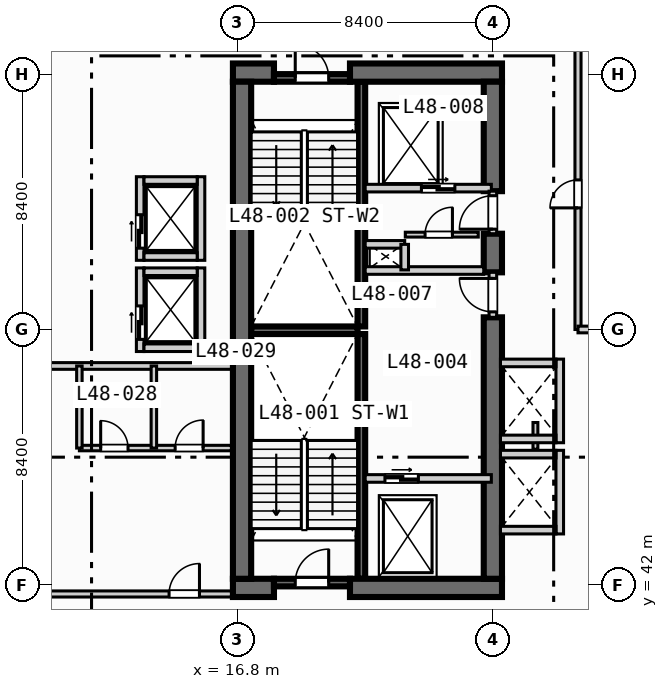
"""IFC4 building model, lengths in metres.
Left out: names, types, materials, properties, quantities, classifications, styles, units other than length and angle.
Written with IfcOpenShell. Run it as: python <this file> out.ifc"""

import sys

from ifc_helpers import new_model, si_unit, direction, frame, frame_2d, origin, place, context, subcontext, project, spatial, rectangle, extrude, element, fill, save


model = new_model("IFC4")
c1 = context("Model", 3, precision=1e-05, world=origin(), true_north=direction((0.0, 1.0)))
c2 = subcontext(c1, "Body", "Model", "MODEL_VIEW")
j1 = project(units=[si_unit("LENGTHUNIT", "METRE"), si_unit("PLANEANGLEUNIT", "RADIAN")], contexts=[c1])
p1 = place(None, origin())
s1 = spatial("IfcSite", under=j1, at=p1, CompositionType="ELEMENT")
p2 = place(p1, origin())
s2 = spatial("IfcBuilding", under=s1, at=p2, CompositionType="ELEMENT")
p3 = place(p2, frame((0.0, 0.0, 197.6)))
s3 = spatial("IfcBuildingStorey", under=s2, at=p3, CompositionType="ELEMENT", Elevation=197.6)
for number, where, z_axis, x_axis in (
    (1, (20.875, 42.2, 0.0), (0.0, 0.0, 1.0), (0.0, 1.0, 0.0)),
    (2, (20.875, 50.5, 0.0), (0.0, 0.0, 1.0), (0.0, 1.0, 0.0)),
):
    element("IfcWall", number, at=place(p3, frame(where, z_axis=z_axis, x_axis=x_axis)), inside=s3, PredefinedType="SOLIDWALL", context=c2, shape_type="SweptSolid", body=[
        extrude(rectangle(XDim=8.05, YDim=0.25, at=frame_2d((4.025, 0.0))), origin(), (0.0, 0.0, 1.0), 3.47),
    ])
p4 = place(p3, frame((17.25, 50.375, 0.0), z_axis=(0.0, 0.0, 1.0), x_axis=(1.0, 0.0, 0.0)))
e3 = element("IfcWall", 3, at=p4, inside=s3, PredefinedType="SOLIDWALL", context=c2, shape_type="SweptSolid", body=[
    extrude(rectangle(XDim=3.5, YDim=0.25, at=frame_2d((1.75, 0.0))), origin(), (0.0, 0.0, 1.0), 3.47),
])
p5 = place(p3, frame((16.65, 41.9, 0.0), z_axis=(0.0, 0.0, 1.0), x_axis=(1.0, 0.0, 0.0)))
e4 = element("IfcWall", 4, at=p5, inside=s3, PredefinedType="SHEAR", context=c2, shape_type="SweptSolid", body=[
    extrude(rectangle(XDim=1.35, YDim=0.6, at=frame_2d((0.675, 0.0))), origin(), (0.0, 0.0, 1.0), 3.47),
])
p6 = place(p3, frame((20.5, 41.9, 0.0), z_axis=(0.0, 0.0, 1.0), x_axis=(1.0, 0.0, 0.0)))
e5 = element("IfcWall", 5, at=p6, inside=s3, PredefinedType="SHEAR", context=c2, shape_type="SweptSolid", body=[
    extrude(rectangle(XDim=5.0, YDim=0.6, at=frame_2d((2.5, 0.0))), origin(), (0.0, 0.0, 1.0), 3.47),
])
p7 = place(p3, frame((16.65, 58.85, 0.0), z_axis=(0.0, 0.0, 1.0), x_axis=(1.0, 0.0, 0.0)))
e6 = element("IfcWall", 6, at=p7, inside=s3, PredefinedType="SHEAR", context=c2, shape_type="SweptSolid", body=[
    extrude(rectangle(XDim=1.35, YDim=0.6, at=frame_2d((0.675, 0.0))), origin(), (0.0, 0.0, 1.0), 3.47),
])
p8 = place(p3, frame((20.5, 58.85, 0.0), z_axis=(0.0, 0.0, 1.0), x_axis=(1.0, 0.0, 0.0)))
e7 = element("IfcWall", 7, at=p8, inside=s3, PredefinedType="SHEAR", context=c2, shape_type="SweptSolid", body=[
    extrude(rectangle(XDim=5.0, YDim=0.6, at=frame_2d((2.5, 0.0))), origin(), (0.0, 0.0, 1.0), 3.47),
])
p9 = place(p3, frame((16.95, 42.2, 0.0), z_axis=(0.0, 0.0, 1.0), x_axis=(0.0, 1.0, 0.0)))
e8 = element("IfcWall", 8, at=p9, inside=s3, PredefinedType="SHEAR", context=c2, shape_type="SweptSolid", body=[
    extrude(rectangle(XDim=16.35, YDim=0.6, at=frame_2d((8.175, 0.0))), origin(), (0.0, 0.0, 1.0), 3.47),
])
p10 = place(p3, frame((25.2, 42.2, 0.0), z_axis=(0.0, 0.0, 1.0), x_axis=(0.0, 1.0, 0.0)))
e9 = element("IfcWall", 9, at=p10, inside=s3, PredefinedType="SHEAR", context=c2, shape_type="SweptSolid", body=[
    extrude(rectangle(XDim=8.6, YDim=0.6, at=frame_2d((4.3, 0.0))), origin(), (0.0, 0.0, 1.0), 3.47),
])
p11 = place(p3, frame((25.2, 52.28, 0.0), z_axis=(0.0, 0.0, 1.0), x_axis=(0.0, 1.0, 0.0)))
e10 = element("IfcWall", 10, at=p11, inside=s3, PredefinedType="SHEAR", context=c2, shape_type="SweptSolid", body=[
    extrude(rectangle(XDim=1.27, YDim=0.6, at=frame_2d((0.635, 0.0))), origin(), (0.0, 0.0, 1.0), 3.47),
])
p12 = place(p3, frame((25.2, 54.95, 0.0), z_axis=(0.0, 0.0, 1.0), x_axis=(0.0, 1.0, 0.0)))
e11 = element("IfcWall", 11, at=p12, inside=s3, PredefinedType="SHEAR", context=c2, shape_type="SweptSolid", body=[
    extrude(rectangle(XDim=3.6, YDim=0.6, at=frame_2d((1.8, 0.0))), origin(), (0.0, 0.0, 1.0), 3.47),
])
p13 = place(p3, frame((18.0, 42.075, 0.0), z_axis=(0.0, 0.0, 1.0), x_axis=(1.0, 0.0, 0.0)))
e12 = element("IfcWall", 12, at=p13, inside=s3, PredefinedType="SOLIDWALL", context=c2, shape_type="SweptSolid", body=[
    extrude(rectangle(XDim=2.5, YDim=0.25, at=frame_2d((1.25, 0.0))), origin(), (0.0, 0.0, 1.0), 3.47),
])
p14 = place(p13, frame((0.7, 0.0, 0.0)))
e13 = element("IfcOpeningElement", 13, at=p14, cuts=e12, PredefinedType="OPENING", context=c2, shape_type="SweptSolid", body=[
    extrude(rectangle(XDim=1.1, YDim=2.15, at=frame_2d((0.55, 1.075))), frame((0.0, 0.135, 0.0), z_axis=(0.0, -1.0, 0.0), x_axis=(1.0, 0.0, 0.0)), (0.0, 0.0, 1.0), 0.27),
])
p15 = place(p3, frame((18.0, 58.675, 0.0), z_axis=(0.0, 0.0, 1.0), x_axis=(1.0, 0.0, 0.0)))
e14 = element("IfcWall", 14, at=p15, inside=s3, PredefinedType="SOLIDWALL", context=c2, shape_type="SweptSolid", body=[
    extrude(rectangle(XDim=2.5, YDim=0.25, at=frame_2d((1.25, 0.0))), origin(), (0.0, 0.0, 1.0), 3.47),
])
p16 = place(p15, frame((0.7, 0.0, 0.0)))
e15 = element("IfcOpeningElement", 15, at=p16, cuts=e14, PredefinedType="OPENING", context=c2, shape_type="SweptSolid", body=[
    extrude(rectangle(XDim=1.1, YDim=2.15, at=frame_2d((0.55, 1.075))), frame((0.0, 0.135, 0.0), z_axis=(0.0, -1.0, 0.0), x_axis=(1.0, 0.0, 0.0)), (0.0, 0.0, 1.0), 0.27),
])
p17 = place(p3, frame((21.0, 45.5, 0.0), z_axis=(0.0, 0.0, 1.0), x_axis=(1.0, 0.0, 0.0)))
e16 = element("IfcWall", 16, at=p17, inside=s3, PredefinedType="SOLIDWALL", context=c2, shape_type="SweptSolid", body=[
    extrude(rectangle(XDim=4.15, YDim=0.25, at=frame_2d((2.075, 0.0))), origin(), (0.0, 0.0, 1.0), 3.47),
])
p18 = place(p17, frame((0.65, 0.0, 0.0)))
e17 = element("IfcOpeningElement", 17, at=p18, cuts=e16, PredefinedType="OPENING", context=c2, shape_type="SweptSolid", body=[
    extrude(rectangle(XDim=1.1, YDim=2.15, at=frame_2d((0.55, 1.075))), frame((0.0, 0.135, 0.0), z_axis=(0.0, -1.0, 0.0), x_axis=(1.0, 0.0, 0.0)), (0.0, 0.0, 1.0), 0.27),
])
p19 = place(p3, frame((25.2, 50.8, 0.0), z_axis=(0.0, 0.0, 1.0), x_axis=(0.0, 1.0, 0.0)))
e18 = element("IfcWall", 18, at=p19, inside=s3, PredefinedType="SOLIDWALL", context=c2, shape_type="SweptSolid", body=[
    extrude(rectangle(XDim=1.48, YDim=0.25, at=frame_2d((0.74, 0.0))), origin(), (0.0, 0.0, 1.0), 3.47),
])
p20 = place(p19, frame((0.18, 0.0, 0.0)))
e19 = element("IfcOpeningElement", 19, at=p20, cuts=e18, PredefinedType="OPENING", context=c2, shape_type="SweptSolid", body=[
    extrude(rectangle(XDim=1.1, YDim=2.15, at=frame_2d((0.55, 1.075))), frame((0.0, 0.135, 0.0), z_axis=(0.0, -1.0, 0.0), x_axis=(1.0, 0.0, 0.0)), (0.0, 0.0, 1.0), 0.27),
])
p21 = place(p3, frame((21.0, 52.34, 0.0), z_axis=(0.0, 0.0, 1.0), x_axis=(1.0, 0.0, 0.0)))
e20 = element("IfcWall", 20, at=p21, inside=s3, PredefinedType="SOLIDWALL", context=c2, shape_type="SweptSolid", body=[
    extrude(rectangle(XDim=3.9, YDim=0.25, at=frame_2d((1.95, 0.0))), origin(), (0.0, 0.0, 1.0), 3.47),
])
p22 = place(p3, frame((21.0, 55.05, 0.0), z_axis=(0.0, 0.0, 1.0), x_axis=(1.0, 0.0, 0.0)))
e21 = element("IfcWall", 21, at=p22, inside=s3, PredefinedType="SOLIDWALL", context=c2, shape_type="SweptSolid", body=[
    extrude(rectangle(XDim=4.15, YDim=0.25, at=frame_2d((2.075, 0.0))), origin(), (0.0, 0.0, 1.0), 3.47),
])
p23 = place(p22, frame((1.85, 0.0, 0.0)))
e22 = element("IfcOpeningElement", 22, at=p23, cuts=e21, PredefinedType="OPENING", context=c2, shape_type="SweptSolid", body=[
    extrude(rectangle(XDim=1.1, YDim=2.15, at=frame_2d((0.55, 1.075))), frame((0.0, 0.135, 0.0), z_axis=(0.0, -1.0, 0.0), x_axis=(1.0, 0.0, 0.0)), (0.0, 0.0, 1.0), 0.27),
])
p24 = place(p3, frame((25.2, 53.55, 0.0), z_axis=(0.0, 0.0, 1.0), x_axis=(0.0, 1.0, 0.0)))
e23 = element("IfcWall", 23, at=p24, inside=s3, PredefinedType="SOLIDWALL", context=c2, shape_type="SweptSolid", body=[
    extrude(rectangle(XDim=1.4, YDim=0.25, at=frame_2d((0.7, 0.0))), origin(), (0.0, 0.0, 1.0), 3.47),
])
p25 = place(p24, frame((0.15, 0.0, 0.0)))
e24 = element("IfcOpeningElement", 24, at=p25, cuts=e23, PredefinedType="OPENING", context=c2, shape_type="SweptSolid", body=[
    extrude(rectangle(XDim=1.1, YDim=2.15, at=frame_2d((0.55, 1.075))), frame((0.0, 0.135, 0.0), z_axis=(0.0, -1.0, 0.0), x_axis=(1.0, 0.0, 0.0)), (0.0, 0.0, 1.0), 0.27),
])
p26 = place(p3, frame((21.0, 53.2, 0.0), z_axis=(0.0, 0.0, 1.0), x_axis=(1.0, 0.0, 0.0)))
e25 = element("IfcWall", 25, at=p26, inside=s3, PredefinedType="SOLIDWALL", context=c2, shape_type="SweptSolid", body=[
    extrude(rectangle(XDim=1.3, YDim=0.25, at=frame_2d((0.65, 0.0))), origin(), (0.0, 0.0, 1.0), 3.47),
])
p27 = place(p3, frame((22.3, 52.36, 0.0), z_axis=(0.0, 0.0, 1.0), x_axis=(0.0, 1.0, 0.0)))
e26 = element("IfcWall", 26, at=p27, inside=s3, PredefinedType="SOLIDWALL", context=c2, shape_type="SweptSolid", body=[
    extrude(rectangle(XDim=0.84, YDim=0.25, at=frame_2d((0.42, 0.0))), origin(), (0.0, 0.0, 1.0), 3.47),
])
p28 = place(p3, frame((22.32, 53.52, 0.0), z_axis=(0.0, 0.0, 1.0), x_axis=(1.0, 0.0, 0.0)))
e27 = element("IfcWall", 27, at=p28, inside=s3, PredefinedType="PARTITIONING", context=c2, shape_type="SweptSolid", body=[
    extrude(rectangle(XDim=2.4, YDim=0.16, at=frame_2d((1.2, 0.0))), origin(), (0.0, 0.0, 1.0), 3.47),
])
p29 = place(p28, frame((0.65, 0.0, 0.0)))
e28 = element("IfcOpeningElement", 28, at=p29, cuts=e27, PredefinedType="OPENING", context=c2, shape_type="SweptSolid", body=[
    extrude(rectangle(XDim=0.9, YDim=2.1, at=frame_2d((0.45, 1.05))), frame((0.0, 0.09, 0.0), z_axis=(0.0, -1.0, 0.0), x_axis=(1.0, 0.0, 0.0)), (0.0, 0.0, 1.0), 0.18),
])
p30 = place(p3, frame((13.6, 49.675, 0.0), z_axis=(0.0, 0.0, 1.0), x_axis=(0.0, 1.0, 0.0)))
e29 = element("IfcWall", 29, at=p30, inside=s3, PredefinedType="SOLIDWALL", context=c2, shape_type="SweptSolid", body=[
    extrude(rectangle(XDim=2.75, YDim=0.25, at=frame_2d((1.375, 0.0))), origin(), (0.0, 0.0, 1.0), 3.47),
])
p31 = place(p30, frame((0.4, 0.0, 0.0)))
e30 = element("IfcOpeningElement", 30, at=p31, cuts=e29, PredefinedType="OPENING", context=c2, shape_type="SweptSolid", body=[
    extrude(rectangle(XDim=1.1, YDim=2.15, at=frame_2d((0.55, 1.075))), frame((0.0, 0.135, 0.0), z_axis=(0.0, -1.0, 0.0), x_axis=(1.0, 0.0, 0.0)), (0.0, 0.0, 1.0), 0.27),
])
p32 = place(p3, frame((15.6, 49.675, 0.0), z_axis=(0.0, 0.0, 1.0), x_axis=(0.0, 1.0, 0.0)))
e31 = element("IfcWall", 31, at=p32, inside=s3, PredefinedType="SOLIDWALL", context=c2, shape_type="SweptSolid", body=[
    extrude(rectangle(XDim=2.75, YDim=0.25, at=frame_2d((1.375, 0.0))), origin(), (0.0, 0.0, 1.0), 3.47),
])
for number, where, z_axis, x_axis in (
    (32, (13.725, 49.8, 0.0), (0.0, 0.0, 1.0), (1.0, 0.0, 0.0)),
    (33, (13.725, 52.3, 0.0), (0.0, 0.0, 1.0), (1.0, 0.0, 0.0)),
):
    element("IfcWall", number, at=place(p3, frame(where, z_axis=z_axis, x_axis=x_axis)), inside=s3, PredefinedType="SOLIDWALL", context=c2, shape_type="SweptSolid", body=[
        extrude(rectangle(XDim=1.75, YDim=0.25, at=frame_2d((0.875, 0.0))), origin(), (0.0, 0.0, 1.0), 3.47),
    ])
p33 = place(p3, frame((13.6, 52.675, 0.0), z_axis=(0.0, 0.0, 1.0), x_axis=(0.0, 1.0, 0.0)))
e34 = element("IfcWall", 34, at=p33, inside=s3, PredefinedType="SOLIDWALL", context=c2, shape_type="SweptSolid", body=[
    extrude(rectangle(XDim=2.75, YDim=0.25, at=frame_2d((1.375, 0.0))), origin(), (0.0, 0.0, 1.0), 3.47),
])
p34 = place(p33, frame((0.4, 0.0, 0.0)))
e35 = element("IfcOpeningElement", 35, at=p34, cuts=e34, PredefinedType="OPENING", context=c2, shape_type="SweptSolid", body=[
    extrude(rectangle(XDim=1.1, YDim=2.15, at=frame_2d((0.55, 1.075))), frame((0.0, 0.135, 0.0), z_axis=(0.0, -1.0, 0.0), x_axis=(1.0, 0.0, 0.0)), (0.0, 0.0, 1.0), 0.27),
])
p35 = place(p3, frame((15.6, 52.675, 0.0), z_axis=(0.0, 0.0, 1.0), x_axis=(0.0, 1.0, 0.0)))
e36 = element("IfcWall", 36, at=p35, inside=s3, PredefinedType="SOLIDWALL", context=c2, shape_type="SweptSolid", body=[
    extrude(rectangle(XDim=2.75, YDim=0.25, at=frame_2d((1.375, 0.0))), origin(), (0.0, 0.0, 1.0), 3.47),
])
for number, where, z_axis, x_axis in (
    (37, (13.725, 52.8, 0.0), (0.0, 0.0, 1.0), (1.0, 0.0, 0.0)),
    (38, (13.725, 55.3, 0.0), (0.0, 0.0, 1.0), (1.0, 0.0, 0.0)),
):
    element("IfcWall", number, at=place(p3, frame(where, z_axis=z_axis, x_axis=x_axis)), inside=s3, PredefinedType="SOLIDWALL", context=c2, shape_type="SweptSolid", body=[
        extrude(rectangle(XDim=1.75, YDim=0.25, at=frame_2d((0.875, 0.0))), origin(), (0.0, 0.0, 1.0), 3.47),
    ])
p36 = place(p3, frame((27.4, 43.675, 0.0), z_axis=(0.0, 0.0, 1.0), x_axis=(0.0, 1.0, 0.0)))
e39 = element("IfcWall", 39, at=p36, inside=s3, PredefinedType="SOLIDWALL", context=c2, shape_type="SweptSolid", body=[
    extrude(rectangle(XDim=2.75, YDim=0.25, at=frame_2d((1.375, 0.0))), origin(), (0.0, 0.0, 1.0), 3.47),
])
for number, where, z_axis, x_axis in (
    (40, (25.45, 43.8, 0.0), (0.0, 0.0, 1.0), (1.0, 0.0, 0.0)),
    (41, (25.45, 46.3, 0.0), (0.0, 0.0, 1.0), (1.0, 0.0, 0.0)),
):
    element("IfcWall", number, at=place(p3, frame(where, z_axis=z_axis, x_axis=x_axis)), inside=s3, PredefinedType="SOLIDWALL", context=c2, shape_type="SweptSolid", body=[
        extrude(rectangle(XDim=1.825, YDim=0.25, at=frame_2d((0.913, 0.0))), origin(), (0.0, 0.0, 1.0), 3.47),
    ])
p37 = place(p3, frame((26.6, 46.46, 0.0), z_axis=(0.0, 0.0, 1.0), x_axis=(0.0, 1.0, 0.0)))
e42 = element("IfcWall", 42, at=p37, inside=s3, PredefinedType="PARTITIONING", context=c2, shape_type="SweptSolid", body=[
    extrude(rectangle(XDim=0.88, YDim=0.16, at=frame_2d((0.44, 0.0))), origin(), (0.0, 0.0, 1.0), 3.47),
])
p38 = place(p3, frame((27.4, 46.675, 0.0), z_axis=(0.0, 0.0, 1.0), x_axis=(0.0, 1.0, 0.0)))
e43 = element("IfcWall", 43, at=p38, inside=s3, PredefinedType="SOLIDWALL", context=c2, shape_type="SweptSolid", body=[
    extrude(rectangle(XDim=2.75, YDim=0.25, at=frame_2d((1.375, 0.0))), origin(), (0.0, 0.0, 1.0), 3.47),
])
for number, where, z_axis, x_axis in (
    (44, (25.45, 46.8, 0.0), (0.0, 0.0, 1.0), (1.0, 0.0, 0.0)),
    (45, (25.45, 49.3, 0.0), (0.0, 0.0, 1.0), (1.0, 0.0, 0.0)),
):
    element("IfcWall", number, at=place(p3, frame(where, z_axis=z_axis, x_axis=x_axis)), inside=s3, PredefinedType="SOLIDWALL", context=c2, shape_type="SweptSolid", body=[
        extrude(rectangle(XDim=1.825, YDim=0.25, at=frame_2d((0.913, 0.0))), origin(), (0.0, 0.0, 1.0), 3.47),
    ])
p39 = place(p3, frame((0.35, 41.7, 0.0), z_axis=(0.0, 0.0, 1.0), x_axis=(1.0, 0.0, 0.0)))
e46 = element("IfcWall", 46, at=p39, inside=s3, PredefinedType="PARTITIONING", context=c2, shape_type="SweptSolid", body=[
    extrude(rectangle(XDim=16.25, YDim=0.2, at=frame_2d((8.125, 0.0))), origin(), (0.0, 0.0, 1.0), 2.82),
])
p40 = place(p39, frame((14.2, 0.0, 0.0)))
e47 = element("IfcOpeningElement", 47, at=p40, cuts=e46, PredefinedType="OPENING", context=c2, shape_type="SweptSolid", body=[
    extrude(rectangle(XDim=1.0, YDim=2.15, at=frame_2d((0.5, 1.075))), frame((0.0, 0.11, 0.0), z_axis=(0.0, -1.0, 0.0), x_axis=(1.0, 0.0, 0.0)), (0.0, 0.0, 1.0), 0.22),
])
p41 = place(p3, frame((0.35, 49.2, 0.0), z_axis=(0.0, 0.0, 1.0), x_axis=(1.0, 0.0, 0.0)))
e48 = element("IfcWall", 48, at=p41, inside=s3, PredefinedType="PARTITIONING", context=c2, shape_type="SweptSolid", body=[
    extrude(rectangle(XDim=16.25, YDim=0.22, at=frame_2d((8.125, 0.0))), origin(), (0.0, 0.0, 1.0), 3.47),
])
p42 = place(p3, frame((11.6, 46.5, 0.0), z_axis=(0.0, 0.0, 1.0), x_axis=(1.0, 0.0, 0.0)))
e49 = element("IfcWall", 49, at=p42, inside=s3, PredefinedType="PLUMBINGWALL", context=c2, shape_type="SweptSolid", body=[
    extrude(rectangle(XDim=5.0, YDim=0.18, at=frame_2d((2.5, 0.0))), origin(), (0.0, 0.0, 1.0), 3.47),
])
p43 = place(p42, frame((0.7, 0.0, 0.0)))
e50 = element("IfcOpeningElement", 50, at=p43, cuts=e49, PredefinedType="OPENING", context=c2, shape_type="SweptSolid", body=[
    extrude(rectangle(XDim=0.9, YDim=2.1, at=frame_2d((0.45, 1.05))), frame((0.0, 0.1, 0.0), z_axis=(0.0, -1.0, 0.0), x_axis=(1.0, 0.0, 0.0)), (0.0, 0.0, 1.0), 0.2),
])
p44 = place(p42, frame((3.15, 0.0, 0.0)))
e51 = element("IfcOpeningElement", 51, at=p44, cuts=e49, PredefinedType="OPENING", context=c2, shape_type="SweptSolid", body=[
    extrude(rectangle(XDim=0.92, YDim=2.1, at=frame_2d((0.46, 1.05))), frame((0.0, 0.1, 0.0), z_axis=(0.0, -1.0, 0.0), x_axis=(1.0, 0.0, 0.0)), (0.0, 0.0, 1.0), 0.2),
])
for number, where, z_axis, x_axis in (
    (52, (11.6, 46.5, 0.0), (0.0, 0.0, 1.0), (0.0, 1.0, 0.0)),
    (53, (14.05, 46.5, 0.0), (0.0, 0.0, 1.0), (0.0, 1.0, 0.0)),
):
    element("IfcWall", number, at=place(p3, frame(where, z_axis=z_axis, x_axis=x_axis)), inside=s3, PredefinedType="PLUMBINGWALL", context=c2, shape_type="SweptSolid", body=[
        extrude(rectangle(XDim=2.7, YDim=0.18, at=frame_2d((1.35, 0.0))), origin(), (0.0, 0.0, 1.0), 3.47),
    ])
p45 = place(p3, frame((28.0, 50.4, 0.0), z_axis=(0.0, 0.0, 1.0), x_axis=(0.0, 1.0, 0.0)))
e54 = element("IfcWall", 54, at=p45, inside=s3, PredefinedType="PARTITIONING", context=c2, shape_type="SweptSolid", body=[
    extrude(rectangle(XDim=21.8, YDim=0.2, at=frame_2d((10.9, 0.0))), origin(), (0.0, 0.0, 1.0), 3.47),
])
p46 = place(p45, frame((4.0, 0.0, 0.0)))
e55 = element("IfcOpeningElement", 55, at=p46, cuts=e54, PredefinedType="OPENING", context=c2, shape_type="SweptSolid", body=[
    extrude(rectangle(XDim=0.92, YDim=2.1, at=frame_2d((0.46, 1.05))), frame((0.0, 0.11, 0.0), z_axis=(0.0, -1.0, 0.0), x_axis=(1.0, 0.0, 0.0)), (0.0, 0.0, 1.0), 0.22),
])
p47 = place(p3, frame((28.0, 50.4, 0.0), z_axis=(0.0, 0.0, 1.0), x_axis=(1.0, 0.0, 0.0)))
e56 = element("IfcWall", 56, at=p47, inside=s3, PredefinedType="PARTITIONING", context=c2, shape_type="SweptSolid", body=[
    extrude(rectangle(XDim=5.3, YDim=0.22, at=frame_2d((2.65, 0.0))), origin(), (0.0, 0.0, 1.0), 3.16),
])
p48 = place(p14, origin())
e57 = element("IfcDoor", 57, at=p48, inside=s3, OperationType="SINGLE_SWING_RIGHT", PredefinedType="DOOR", context=c2, shape_type="SweptSolid", body=[
    extrude(rectangle(XDim=1.1, YDim=2.15, at=frame_2d((0.55, 1.075))), frame((0.0, 0.025, 0.0), z_axis=(0.0, -1.0, 0.0), x_axis=(1.0, 0.0, 0.0)), (0.0, 0.0, 1.0), 0.05),
])
fill(e13, e57)
p49 = place(p16, origin())
e58 = element("IfcDoor", 58, at=p49, inside=s3, OperationType="SINGLE_SWING_LEFT", PredefinedType="DOOR", context=c2, shape_type="SweptSolid", body=[
    extrude(rectangle(XDim=1.1, YDim=2.15, at=frame_2d((0.55, 1.075))), frame((0.0, 0.025, 0.0), z_axis=(0.0, -1.0, 0.0), x_axis=(1.0, 0.0, 0.0)), (0.0, 0.0, 1.0), 0.05),
])
fill(e15, e58)
p50 = place(p18, origin())
e59 = element("IfcDoor", 59, at=p50, inside=s3, OperationType="SLIDING_TO_LEFT", PredefinedType="DOOR", context=c2, shape_type="SweptSolid", body=[
    extrude(rectangle(XDim=1.1, YDim=2.15, at=frame_2d((0.55, 1.075))), frame((0.0, 0.025, 0.0), z_axis=(0.0, -1.0, 0.0), x_axis=(1.0, 0.0, 0.0)), (0.0, 0.0, 1.0), 0.05),
])
fill(e17, e59)
p51 = place(p20, origin())
e60 = element("IfcDoor", 60, at=p51, inside=s3, OperationType="SINGLE_SWING_RIGHT", PredefinedType="DOOR", context=c2, shape_type="SweptSolid", body=[
    extrude(rectangle(XDim=1.1, YDim=2.15, at=frame_2d((0.55, 1.075))), frame((0.0, 0.025, 0.0), z_axis=(0.0, -1.0, 0.0), x_axis=(1.0, 0.0, 0.0)), (0.0, 0.0, 1.0), 0.05),
])
fill(e19, e60)
p52 = place(p23, origin())
e61 = element("IfcDoor", 61, at=p52, inside=s3, OperationType="SLIDING_TO_LEFT", PredefinedType="DOOR", context=c2, shape_type="SweptSolid", body=[
    extrude(rectangle(XDim=1.1, YDim=2.15, at=frame_2d((0.55, 1.075))), frame((0.0, 0.025, 0.0), z_axis=(0.0, -1.0, 0.0), x_axis=(1.0, 0.0, 0.0)), (0.0, 0.0, 1.0), 0.05),
])
fill(e22, e61)
p53 = place(p25, origin())
e62 = element("IfcDoor", 62, at=p53, inside=s3, OperationType="SINGLE_SWING_LEFT", PredefinedType="DOOR", context=c2, shape_type="SweptSolid", body=[
    extrude(rectangle(XDim=1.1, YDim=2.15, at=frame_2d((0.55, 1.075))), frame((0.0, 0.025, 0.0), z_axis=(0.0, -1.0, 0.0), x_axis=(1.0, 0.0, 0.0)), (0.0, 0.0, 1.0), 0.05),
])
fill(e24, e62)
p54 = place(p29, origin())
e63 = element("IfcDoor", 63, at=p54, inside=s3, OperationType="SINGLE_SWING_RIGHT", PredefinedType="DOOR", context=c2, shape_type="SweptSolid", body=[
    extrude(rectangle(XDim=0.9, YDim=2.1, at=frame_2d((0.45, 1.05))), frame((0.0, 0.025, 0.0), z_axis=(0.0, -1.0, 0.0), x_axis=(1.0, 0.0, 0.0)), (0.0, 0.0, 1.0), 0.05),
])
fill(e28, e63)
p55 = place(p31, origin())
e64 = element("IfcDoor", 64, at=p55, inside=s3, OperationType="SLIDING_TO_LEFT", PredefinedType="DOOR", context=c2, shape_type="SweptSolid", body=[
    extrude(rectangle(XDim=1.1, YDim=2.15, at=frame_2d((0.55, 1.075))), frame((0.0, 0.025, 0.0), z_axis=(0.0, -1.0, 0.0), x_axis=(1.0, 0.0, 0.0)), (0.0, 0.0, 1.0), 0.05),
])
fill(e30, e64)
p56 = place(p34, origin())
e65 = element("IfcDoor", 65, at=p56, inside=s3, OperationType="SLIDING_TO_LEFT", PredefinedType="DOOR", context=c2, shape_type="SweptSolid", body=[
    extrude(rectangle(XDim=1.1, YDim=2.15, at=frame_2d((0.55, 1.075))), frame((0.0, 0.025, 0.0), z_axis=(0.0, -1.0, 0.0), x_axis=(1.0, 0.0, 0.0)), (0.0, 0.0, 1.0), 0.05),
])
fill(e35, e65)
p57 = place(p40, origin())
e66 = element("IfcDoor", 66, at=p57, inside=s3, OperationType="SINGLE_SWING_RIGHT", PredefinedType="DOOR", context=c2, shape_type="SweptSolid", body=[
    extrude(rectangle(XDim=1.0, YDim=2.15, at=frame_2d((0.5, 1.075))), frame((0.0, 0.025, 0.0), z_axis=(0.0, -1.0, 0.0), x_axis=(1.0, 0.0, 0.0)), (0.0, 0.0, 1.0), 0.05),
])
fill(e47, e66)
p58 = place(p43, origin())
e67 = element("IfcDoor", 67, at=p58, inside=s3, OperationType="SINGLE_SWING_LEFT", PredefinedType="DOOR", context=c2, shape_type="SweptSolid", body=[
    extrude(rectangle(XDim=0.9, YDim=2.1, at=frame_2d((0.45, 1.05))), frame((0.0, 0.025, 0.0), z_axis=(0.0, -1.0, 0.0), x_axis=(1.0, 0.0, 0.0)), (0.0, 0.0, 1.0), 0.05),
])
fill(e50, e67)
p59 = place(p44, origin())
e68 = element("IfcDoor", 68, at=p59, inside=s3, OperationType="SINGLE_SWING_RIGHT", PredefinedType="DOOR", context=c2, shape_type="SweptSolid", body=[
    extrude(rectangle(XDim=0.92, YDim=2.1, at=frame_2d((0.46, 1.05))), frame((0.0, 0.025, 0.0), z_axis=(0.0, -1.0, 0.0), x_axis=(1.0, 0.0, 0.0)), (0.0, 0.0, 1.0), 0.05),
])
fill(e51, e68)
p60 = place(p46, origin())
e69 = element("IfcDoor", 69, at=p60, inside=s3, OperationType="SINGLE_SWING_LEFT", PredefinedType="DOOR", context=c2, shape_type="SweptSolid", body=[
    extrude(rectangle(XDim=0.92, YDim=2.1, at=frame_2d((0.46, 1.05))), frame((0.0, 0.025, 0.0), z_axis=(0.0, -1.0, 0.0), x_axis=(1.0, 0.0, 0.0)), (0.0, 0.0, 1.0), 0.05),
])
fill(e55, e69)
save(model, sys.argv[1])
